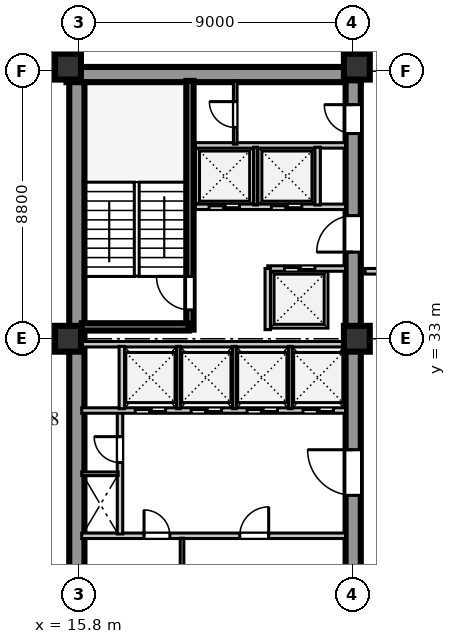
"""IFC4 building model, lengths in metres.
Left out: names, types, materials, properties, quantities, classifications, styles, units other than length and angle.
Written with IfcOpenShell. Run it as: python <this file> out.ifc"""

import sys

from ifc_helpers import new_model, si_unit, direction, frame, frame_2d, origin, origin_2d, place, context, subcontext, project, spatial, rectangle, extrude, element, fill, save


model = new_model("IFC4")
c1 = context("Model", 3, precision=1e-05, world=origin(), true_north=direction((0.0, 1.0)))
c2 = subcontext(c1, "Body", "Model", "MODEL_VIEW")
j1 = project(units=[si_unit("LENGTHUNIT", "METRE"), si_unit("PLANEANGLEUNIT", "RADIAN")], contexts=[c1])
p1 = place(None, origin())
s1 = spatial("IfcSite", under=j1, at=p1, CompositionType="ELEMENT")
p2 = place(p1, origin())
s2 = spatial("IfcBuilding", under=s1, at=p2, CompositionType="ELEMENT")
p3 = place(p2, frame((0.0, 0.0, 157.9)))
s3 = spatial("IfcBuildingStorey", under=s2, at=p3, CompositionType="ELEMENT", Elevation=157.9)
p4 = place(p3, frame((15.4, 41.69, 0.0), z_axis=(0.0, 0.0, 1.0), x_axis=(1.0, 0.0, 0.0)))
e1 = element("IfcWall", 1, at=p4, inside=s3, PredefinedType="SHEAR", context=c2, shape_type="SweptSolid", body=[
    extrude(rectangle(XDim=9.68, YDim=0.5, at=frame_2d((4.84, 0.0))), origin(), (0.0, 0.0, 1.0), 3.6),
])
p5 = place(p3, frame((15.74, 15.81, 0.0), z_axis=(0.0, 0.0, 1.0), x_axis=(0.0, 1.0, 0.0)))
e2 = element("IfcWall", 2, at=p5, inside=s3, PredefinedType="SHEAR", context=c2, shape_type="SweptSolid", body=[
    extrude(rectangle(XDim=25.63, YDim=0.5, at=frame_2d((12.815, 0.0))), origin(), (0.0, 0.0, 1.0), 3.6),
])
p6 = place(p3, frame((24.83, 15.74, 0.0), z_axis=(0.0, 0.0, 1.0), x_axis=(0.0, 1.0, 0.0)))
e3 = element("IfcWall", 3, at=p6, inside=s3, PredefinedType="SHEAR", context=c2, shape_type="SweptSolid", body=[
    extrude(rectangle(XDim=25.76, YDim=0.5, at=frame_2d((12.88, 0.0))), origin(), (0.0, 0.0, 1.0), 3.6),
])
p7 = place(p6, frame((1.61, 0.0, 0.0)))
e4 = element("IfcOpeningElement", 4, at=p7, cuts=e3, PredefinedType="OPENING", context=c2, shape_type="SweptSolid", body=[
    extrude(rectangle(XDim=1.2, YDim=2.1, at=frame_2d((0.6, 1.05))), frame((0.0, 0.26, 0.0), z_axis=(0.0, -1.0, 0.0), x_axis=(1.0, 0.0, 0.0)), (0.0, 0.0, 1.0), 0.52),
])
p8 = place(p6, frame((6.78, 0.0, 0.0)))
e5 = element("IfcOpeningElement", 5, at=p8, cuts=e3, PredefinedType="OPENING", context=c2, shape_type="SweptSolid", body=[
    extrude(rectangle(XDim=0.85, YDim=2.06, at=frame_2d((0.425, 1.03))), frame((0.0, 0.26, 0.0), z_axis=(0.0, -1.0, 0.0), x_axis=(1.0, 0.0, 0.0)), (0.0, 0.0, 1.0), 0.52),
])
p9 = place(p6, frame((12.11, 0.0, 0.0)))
e6 = element("IfcOpeningElement", 6, at=p9, cuts=e3, PredefinedType="OPENING", context=c2, shape_type="SweptSolid", body=[
    extrude(rectangle(XDim=1.5, YDim=2.12, at=frame_2d((0.75, 1.06))), frame((0.0, 0.26, 0.0), z_axis=(0.0, -1.0, 0.0), x_axis=(1.0, 0.0, 0.0)), (0.0, 0.0, 1.0), 0.52),
])
p10 = place(p6, frame((20.11, 0.0, 0.0)))
e7 = element("IfcOpeningElement", 7, at=p10, cuts=e3, PredefinedType="OPENING", context=c2, shape_type="SweptSolid", body=[
    extrude(rectangle(XDim=1.2, YDim=2.12, at=frame_2d((0.6, 1.06))), frame((0.0, 0.26, 0.0), z_axis=(0.0, -1.0, 0.0), x_axis=(1.0, 0.0, 0.0)), (0.0, 0.0, 1.0), 0.52),
])
p11 = place(p6, frame((24.01, 0.0, 0.0)))
e8 = element("IfcOpeningElement", 8, at=p11, cuts=e3, PredefinedType="OPENING", context=c2, shape_type="SweptSolid", body=[
    extrude(rectangle(XDim=0.95, YDim=2.1, at=frame_2d((0.475, 1.05))), frame((0.0, 0.26, 0.0), z_axis=(0.0, -1.0, 0.0), x_axis=(1.0, 0.0, 0.0)), (0.0, 0.0, 1.0), 0.52),
])
for number, where, z_axis, x_axis in (
    (9, (15.45, 33.0, 0.0), (0.0, 0.0, 1.0), (1.0, 0.0, 0.0)),
    (10, (15.45, 41.95, 0.0), (0.0, 0.0, 1.0), (1.0, 0.0, 0.0)),
    (11, (24.95, 33.0, 0.0), (0.0, 0.0, 1.0), (1.0, 0.0, 0.0)),
    (12, (24.95, 41.95, 0.0), (0.0, 0.0, 1.0), (1.0, 0.0, 0.0)),
):
    element("IfcColumn", number, at=place(p3, frame(where, z_axis=z_axis, x_axis=x_axis)), inside=s3, PredefinedType="COLUMN", context=c2, shape_type="SweptSolid", body=[
        extrude(rectangle(XDim=0.85, YDim=0.85, at=origin_2d()), origin(), (0.0, 0.0, 1.0), 3.6),
    ])
p12 = place(p3, frame((15.9, 26.52, 0.0), z_axis=(0.0, 0.0, 1.0), x_axis=(1.0, 0.0, 0.0)))
e13 = element("IfcWall", 13, at=p12, inside=s3, PredefinedType="SOLIDWALL", context=c2, shape_type="SweptSolid", body=[
    extrude(rectangle(XDim=8.68, YDim=0.18, at=frame_2d((4.34, 0.0))), origin(), (0.0, 0.0, 1.0), 3.6),
])
p13 = place(p12, frame((2.05, 0.0, 0.0)))
e14 = element("IfcOpeningElement", 14, at=p13, cuts=e13, PredefinedType="OPENING", context=c2, shape_type="SweptSolid", body=[
    extrude(rectangle(XDim=0.85, YDim=2.06, at=frame_2d((0.425, 1.03))), frame((0.0, 0.1, 0.0), z_axis=(0.0, -1.0, 0.0), x_axis=(1.0, 0.0, 0.0)), (0.0, 0.0, 1.0), 0.2),
])
p14 = place(p12, frame((5.2, 0.0, 0.0)))
e15 = element("IfcOpeningElement", 15, at=p14, cuts=e13, PredefinedType="OPENING", context=c2, shape_type="SweptSolid", body=[
    extrude(rectangle(XDim=0.95, YDim=2.1, at=frame_2d((0.475, 1.05))), frame((0.0, 0.1, 0.0), z_axis=(0.0, -1.0, 0.0), x_axis=(1.0, 0.0, 0.0)), (0.0, 0.0, 1.0), 0.2),
])
p15 = place(p3, frame((19.2, 24.42, 0.0), z_axis=(0.0, 0.0, 1.0), x_axis=(0.0, 1.0, 0.0)))
e16 = element("IfcWall", 16, at=p15, inside=s3, PredefinedType="PARTITIONING", context=c2, shape_type="SweptSolid", body=[
    extrude(rectangle(XDim=2.02, YDim=0.12, at=frame_2d((1.01, 0.0))), origin(), (0.0, 0.0, 1.0), 3.6),
])
p16 = place(p3, frame((17.16, 26.58, 0.0), z_axis=(0.0, 0.0, 1.0), x_axis=(0.0, 1.0, 0.0)))
e17 = element("IfcWall", 17, at=p16, inside=s3, PredefinedType="SOLIDWALL", context=c2, shape_type="SweptSolid", body=[
    extrude(rectangle(XDim=4.02, YDim=0.18, at=frame_2d((2.01, 0.0))), origin(), (0.0, 0.0, 1.0), 3.6),
])
p17 = place(p16, frame((2.35, 0.0, 0.0)))
e18 = element("IfcOpeningElement", 18, at=p17, cuts=e17, PredefinedType="OPENING", context=c2, shape_type="SweptSolid", body=[
    extrude(rectangle(XDim=0.85, YDim=2.06, at=frame_2d((0.425, 1.03))), frame((0.0, 0.1, 0.0), z_axis=(0.0, -1.0, 0.0), x_axis=(1.0, 0.0, 0.0)), (0.0, 0.0, 1.0), 0.2),
])
p18 = place(p3, frame((15.9, 28.56, 0.0), z_axis=(0.0, 0.0, 1.0), x_axis=(1.0, 0.0, 0.0)))
e19 = element("IfcWall", 19, at=p18, inside=s3, PredefinedType="PARTITIONING", context=c2, shape_type="SweptSolid", body=[
    extrude(rectangle(XDim=1.2, YDim=0.12, at=frame_2d((0.6, 0.0))), origin(), (0.0, 0.0, 1.0), 3.6),
])
p19 = place(p3, frame((15.9, 30.64, 0.0), z_axis=(0.0, 0.0, 1.0), x_axis=(1.0, 0.0, 0.0)))
e20 = element("IfcWall", 20, at=p19, inside=s3, PredefinedType="SOLIDWALL", context=c2, shape_type="SweptSolid", body=[
    extrude(rectangle(XDim=8.68, YDim=0.18, at=frame_2d((4.34, 0.0))), origin(), (0.0, 0.0, 1.0), 3.6),
])
p20 = place(p19, frame((1.76, 0.0, 0.0)))
e21 = element("IfcOpeningElement", 21, at=p20, cuts=e20, PredefinedType="OPENING", context=c2, shape_type="SweptSolid", body=[
    extrude(rectangle(XDim=1.0, YDim=2.1, at=frame_2d((0.5, 1.05))), frame((0.0, 0.1, 0.0), z_axis=(0.0, -1.0, 0.0), x_axis=(1.0, 0.0, 0.0)), (0.0, 0.0, 1.0), 0.2),
])
p21 = place(p19, frame((3.6, 0.0, 0.0)))
e22 = element("IfcOpeningElement", 22, at=p21, cuts=e20, PredefinedType="OPENING", context=c2, shape_type="SweptSolid", body=[
    extrude(rectangle(XDim=1.0, YDim=2.1, at=frame_2d((0.5, 1.05))), frame((0.0, 0.1, 0.0), z_axis=(0.0, -1.0, 0.0), x_axis=(1.0, 0.0, 0.0)), (0.0, 0.0, 1.0), 0.2),
])
p22 = place(p19, frame((5.44, 0.0, 0.0)))
e23 = element("IfcOpeningElement", 23, at=p22, cuts=e20, PredefinedType="OPENING", context=c2, shape_type="SweptSolid", body=[
    extrude(rectangle(XDim=1.0, YDim=2.1, at=frame_2d((0.5, 1.05))), frame((0.0, 0.1, 0.0), z_axis=(0.0, -1.0, 0.0), x_axis=(1.0, 0.0, 0.0)), (0.0, 0.0, 1.0), 0.2),
])
p23 = place(p19, frame((7.28, 0.0, 0.0)))
e24 = element("IfcOpeningElement", 24, at=p23, cuts=e20, PredefinedType="OPENING", context=c2, shape_type="SweptSolid", body=[
    extrude(rectangle(XDim=1.0, YDim=2.1, at=frame_2d((0.5, 1.05))), frame((0.0, 0.1, 0.0), z_axis=(0.0, -1.0, 0.0), x_axis=(1.0, 0.0, 0.0)), (0.0, 0.0, 1.0), 0.2),
])
p24 = place(p3, frame((15.9, 32.82, 0.0), z_axis=(0.0, 0.0, 1.0), x_axis=(1.0, 0.0, 0.0)))
e25 = element("IfcWall", 25, at=p24, inside=s3, PredefinedType="SOLIDWALL", context=c2, shape_type="SweptSolid", body=[
    extrude(rectangle(XDim=8.68, YDim=0.18, at=frame_2d((4.34, 0.0))), origin(), (0.0, 0.0, 1.0), 2.95),
])
p25 = place(p3, frame((17.22, 30.7, 0.0), z_axis=(0.0, 0.0, 1.0), x_axis=(0.0, 1.0, 0.0)))
e26 = element("IfcWall", 26, at=p25, inside=s3, PredefinedType="SOLIDWALL", context=c2, shape_type="SweptSolid", body=[
    extrude(rectangle(XDim=2.05, YDim=0.18, at=frame_2d((1.025, 0.0))), origin(), (0.0, 0.0, 1.0), 3.6),
])
for number, where, z_axis, x_axis in (
    (27, (19.08, 30.7, 0.0), (0.0, 0.0, 1.0), (0.0, 1.0, 0.0)),
    (28, (20.92, 30.7, 0.0), (0.0, 0.0, 1.0), (0.0, 1.0, 0.0)),
    (29, (22.76, 30.7, 0.0), (0.0, 0.0, 1.0), (0.0, 1.0, 0.0)),
):
    element("IfcWall", number, at=place(p3, frame(where, z_axis=z_axis, x_axis=x_axis)), inside=s3, PredefinedType="PARTITIONING", context=c2, shape_type="SweptSolid", body=[
        extrude(rectangle(XDim=2.05, YDim=0.12, at=frame_2d((1.025, 0.0))), origin(), (0.0, 0.0, 1.0), 3.6),
    ])
p26 = place(p3, frame((19.46, 33.3, 0.0), z_axis=(0.0, 0.0, 1.0), x_axis=(0.0, 1.0, 0.0)))
e30 = element("IfcWall", 30, at=p26, inside=s3, PredefinedType="SHEAR", context=c2, shape_type="SweptSolid", body=[
    extrude(rectangle(XDim=8.18, YDim=0.24, at=frame_2d((4.09, 0.0))), origin(), (0.0, 0.0, 1.0), 3.85),
])
p27 = place(p26, frame((0.65, 0.0, 0.0)))
e31 = element("IfcOpeningElement", 31, at=p27, cuts=e30, PredefinedType="OPENING", context=c2, shape_type="SweptSolid", body=[
    extrude(rectangle(XDim=1.1, YDim=2.1, at=frame_2d((0.55, 1.05))), frame((0.0, 0.13, 0.0), z_axis=(0.0, -1.0, 0.0), x_axis=(1.0, 0.0, 0.0)), (0.0, 0.0, 1.0), 0.26),
])
p28 = place(p3, frame((15.9, 33.39, 0.0), z_axis=(0.0, 0.0, 1.0), x_axis=(1.0, 0.0, 0.0)))
e32 = element("IfcWall", 32, at=p28, inside=s3, PredefinedType="SHEAR", context=c2, shape_type="SweptSolid", body=[
    extrude(rectangle(XDim=3.52, YDim=0.24, at=frame_2d((1.76, 0.0))), origin(), (0.0, 0.0, 1.0), 3.85),
])
p29 = place(p3, frame((22.02, 35.31, 0.0), z_axis=(0.0, 0.0, 1.0), x_axis=(1.0, 0.0, 0.0)))
e33 = element("IfcWall", 33, at=p29, inside=s3, PredefinedType="SOLIDWALL", context=c2, shape_type="SweptSolid", body=[
    extrude(rectangle(XDim=2.56, YDim=0.18, at=frame_2d((1.28, 0.0))), origin(), (0.0, 0.0, 1.0), 3.6),
])
p30 = place(p29, frame((0.55, 0.0, 0.0)))
e34 = element("IfcOpeningElement", 34, at=p30, cuts=e33, PredefinedType="OPENING", context=c2, shape_type="SweptSolid", body=[
    extrude(rectangle(XDim=1.0, YDim=2.1, at=frame_2d((0.5, 1.05))), frame((0.0, 0.1, 0.0), z_axis=(0.0, -1.0, 0.0), x_axis=(1.0, 0.0, 0.0)), (0.0, 0.0, 1.0), 0.2),
])
p31 = place(p3, frame((22.02, 33.3, 0.0), z_axis=(0.0, 0.0, 1.0), x_axis=(0.0, 1.0, 0.0)))
e35 = element("IfcWall", 35, at=p31, inside=s3, PredefinedType="SOLIDWALL", context=c2, shape_type="SweptSolid", body=[
    extrude(rectangle(XDim=2.01, YDim=0.18, at=frame_2d((1.005, 0.0))), origin(), (0.0, 0.0, 1.0), 3.6),
])
p32 = place(p3, frame((19.64, 37.34, 0.0), z_axis=(0.0, 0.0, 1.0), x_axis=(1.0, 0.0, 0.0)))
e36 = element("IfcWall", 36, at=p32, inside=s3, PredefinedType="SOLIDWALL", context=c2, shape_type="SweptSolid", body=[
    extrude(rectangle(XDim=4.94, YDim=0.18, at=frame_2d((2.47, 0.0))), origin(), (0.0, 0.0, 1.0), 3.6),
])
p33 = place(p32, frame((0.45, 0.0, 0.0)))
e37 = element("IfcOpeningElement", 37, at=p33, cuts=e36, PredefinedType="OPENING", context=c2, shape_type="SweptSolid", body=[
    extrude(rectangle(XDim=1.0, YDim=2.1, at=frame_2d((0.5, 1.05))), frame((0.0, 0.1, 0.0), z_axis=(0.0, -1.0, 0.0), x_axis=(1.0, 0.0, 0.0)), (0.0, 0.0, 1.0), 0.2),
])
p34 = place(p32, frame((2.5, 0.0, 0.0)))
e38 = element("IfcOpeningElement", 38, at=p34, cuts=e36, PredefinedType="OPENING", context=c2, shape_type="SweptSolid", body=[
    extrude(rectangle(XDim=1.0, YDim=2.1, at=frame_2d((0.5, 1.05))), frame((0.0, 0.1, 0.0), z_axis=(0.0, -1.0, 0.0), x_axis=(1.0, 0.0, 0.0)), (0.0, 0.0, 1.0), 0.2),
])
p35 = place(p3, frame((19.64, 39.36, 0.0), z_axis=(0.0, 0.0, 1.0), x_axis=(1.0, 0.0, 0.0)))
e39 = element("IfcWall", 39, at=p35, inside=s3, PredefinedType="SOLIDWALL", context=c2, shape_type="SweptSolid", body=[
    extrude(rectangle(XDim=4.94, YDim=0.18, at=frame_2d((2.47, 0.0))), origin(), (0.0, 0.0, 1.0), 3.6),
])
p36 = place(p3, frame((21.62, 37.4, 0.0), z_axis=(0.0, 0.0, 1.0), x_axis=(0.0, 1.0, 0.0)))
e40 = element("IfcWall", 40, at=p36, inside=s3, PredefinedType="PARTITIONING", context=c2, shape_type="SweptSolid", body=[
    extrude(rectangle(XDim=1.9, YDim=0.12, at=frame_2d((0.95, 0.0))), origin(), (0.0, 0.0, 1.0), 3.6),
])
p37 = place(p3, frame((23.66, 37.4, 0.0), z_axis=(0.0, 0.0, 1.0), x_axis=(0.0, 1.0, 0.0)))
e41 = element("IfcWall", 41, at=p37, inside=s3, PredefinedType="SOLIDWALL", context=c2, shape_type="SweptSolid", body=[
    extrude(rectangle(XDim=1.9, YDim=0.18, at=frame_2d((0.95, 0.0))), origin(), (0.0, 0.0, 1.0), 3.6),
])
p38 = place(p3, frame((20.95, 39.4, 0.0), z_axis=(0.0, 0.0, 1.0), x_axis=(0.0, 1.0, 0.0)))
e42 = element("IfcWall", 42, at=p38, inside=s3, PredefinedType="PARTITIONING", context=c2, shape_type="SweptSolid", body=[
    extrude(rectangle(XDim=2.08, YDim=0.12, at=frame_2d((1.04, 0.0))), origin(), (0.0, 0.0, 1.0), 3.6),
])
p39 = place(p38, frame((0.55, 0.0, 0.0)))
e43 = element("IfcOpeningElement", 43, at=p39, cuts=e42, PredefinedType="OPENING", context=c2, shape_type="SweptSolid", body=[
    extrude(rectangle(XDim=0.85, YDim=2.06, at=frame_2d((0.425, 1.03))), frame((0.0, 0.07, 0.0), z_axis=(0.0, -1.0, 0.0), x_axis=(1.0, 0.0, 0.0)), (0.0, 0.0, 1.0), 0.14),
])
p40 = place(p3, frame((25.22, 35.22, 0.0), z_axis=(0.0, 0.0, 1.0), x_axis=(1.0, 0.0, 0.0)))
e44 = element("IfcWall", 44, at=p40, inside=s3, PredefinedType="SOLIDWALL", context=c2, shape_type="SweptSolid", body=[
    extrude(rectangle(XDim=9.5, YDim=0.185, at=frame_2d((4.75, 0.0))), origin(), (0.0, 0.0, 1.0), 3.6),
])
p41 = place(p40, frame((1.2, 0.0, 0.0)))
e45 = element("IfcOpeningElement", 45, at=p41, cuts=e44, PredefinedType="OPENING", context=c2, shape_type="SweptSolid", body=[
    extrude(rectangle(XDim=0.95, YDim=2.1, at=frame_2d((0.475, 1.05))), frame((0.0, 0.103, 0.0), z_axis=(0.0, -1.0, 0.0), x_axis=(1.0, 0.0, 0.0)), (0.0, 0.0, 1.0), 0.205),
])
p42 = place(p13, origin())
e46 = element("IfcDoor", 46, at=p42, inside=s3, OperationType="SINGLE_SWING_LEFT", PredefinedType="DOOR", context=c2, shape_type="SweptSolid", body=[
    extrude(rectangle(XDim=0.85, YDim=2.06, at=frame_2d((0.425, 1.03))), frame((0.0, 0.025, 0.0), z_axis=(0.0, -1.0, 0.0), x_axis=(1.0, 0.0, 0.0)), (0.0, 0.0, 1.0), 0.05),
])
fill(e14, e46)
p43 = place(p14, origin())
e47 = element("IfcDoor", 47, at=p43, inside=s3, OperationType="SINGLE_SWING_RIGHT", PredefinedType="DOOR", context=c2, shape_type="SweptSolid", body=[
    extrude(rectangle(XDim=0.95, YDim=2.1, at=frame_2d((0.475, 1.05))), frame((0.0, 0.025, 0.0), z_axis=(0.0, -1.0, 0.0), x_axis=(1.0, 0.0, 0.0)), (0.0, 0.0, 1.0), 0.05),
])
fill(e15, e47)
p44 = place(p17, origin())
e48 = element("IfcDoor", 48, at=p44, inside=s3, OperationType="SINGLE_SWING_RIGHT", PredefinedType="DOOR", context=c2, shape_type="SweptSolid", body=[
    extrude(rectangle(XDim=0.85, YDim=2.06, at=frame_2d((0.425, 1.03))), frame((0.0, 0.025, 0.0), z_axis=(0.0, -1.0, 0.0), x_axis=(1.0, 0.0, 0.0)), (0.0, 0.0, 1.0), 0.05),
])
fill(e18, e48)
p45 = place(p9, frame((1.5, 0.0, 0.0), z_axis=(0.0, 0.0, 1.0), x_axis=(-1.0, 0.0, 0.0)))
e49 = element("IfcDoor", 49, at=p45, inside=s3, OperationType="SINGLE_SWING_LEFT", PredefinedType="DOOR", context=c2, shape_type="SweptSolid", body=[
    extrude(rectangle(XDim=1.5, YDim=2.12, at=frame_2d((0.75, 1.06))), frame((0.0, 0.025, 0.0), z_axis=(0.0, -1.0, 0.0), x_axis=(1.0, 0.0, 0.0)), (0.0, 0.0, 1.0), 0.05),
])
fill(e6, e49)
p46 = place(p20, frame((1.0, 0.0, 0.0), z_axis=(0.0, 0.0, 1.0), x_axis=(-1.0, 0.0, 0.0)))
e50 = element("IfcDoor", 50, at=p46, inside=s3, OperationType="DOUBLE_DOOR_SLIDING", PredefinedType="DOOR", context=c2, shape_type="SweptSolid", body=[
    extrude(rectangle(XDim=1.0, YDim=2.1, at=frame_2d((0.5, 1.05))), frame((0.0, 0.025, 0.0), z_axis=(0.0, -1.0, 0.0), x_axis=(1.0, 0.0, 0.0)), (0.0, 0.0, 1.0), 0.05),
])
fill(e21, e50)
p47 = place(p21, frame((1.0, 0.0, 0.0), z_axis=(0.0, 0.0, 1.0), x_axis=(-1.0, 0.0, 0.0)))
e51 = element("IfcDoor", 51, at=p47, inside=s3, OperationType="DOUBLE_DOOR_SLIDING", PredefinedType="DOOR", context=c2, shape_type="SweptSolid", body=[
    extrude(rectangle(XDim=1.0, YDim=2.1, at=frame_2d((0.5, 1.05))), frame((0.0, 0.025, 0.0), z_axis=(0.0, -1.0, 0.0), x_axis=(1.0, 0.0, 0.0)), (0.0, 0.0, 1.0), 0.05),
])
fill(e22, e51)
p48 = place(p22, frame((1.0, 0.0, 0.0), z_axis=(0.0, 0.0, 1.0), x_axis=(-1.0, 0.0, 0.0)))
e52 = element("IfcDoor", 52, at=p48, inside=s3, OperationType="DOUBLE_DOOR_SLIDING", PredefinedType="DOOR", context=c2, shape_type="SweptSolid", body=[
    extrude(rectangle(XDim=1.0, YDim=2.1, at=frame_2d((0.5, 1.05))), frame((0.0, 0.025, 0.0), z_axis=(0.0, -1.0, 0.0), x_axis=(1.0, 0.0, 0.0)), (0.0, 0.0, 1.0), 0.05),
])
fill(e23, e52)
p49 = place(p23, frame((1.0, 0.0, 0.0), z_axis=(0.0, 0.0, 1.0), x_axis=(-1.0, 0.0, 0.0)))
e53 = element("IfcDoor", 53, at=p49, inside=s3, OperationType="DOUBLE_DOOR_SLIDING", PredefinedType="DOOR", context=c2, shape_type="SweptSolid", body=[
    extrude(rectangle(XDim=1.0, YDim=2.1, at=frame_2d((0.5, 1.05))), frame((0.0, 0.025, 0.0), z_axis=(0.0, -1.0, 0.0), x_axis=(1.0, 0.0, 0.0)), (0.0, 0.0, 1.0), 0.05),
])
fill(e24, e53)
p50 = place(p27, origin())
e54 = element("IfcDoor", 54, at=p50, inside=s3, OperationType="SINGLE_SWING_RIGHT", PredefinedType="DOOR", context=c2, shape_type="SweptSolid", body=[
    extrude(rectangle(XDim=1.1, YDim=2.1, at=frame_2d((0.55, 1.05))), frame((0.0, 0.025, 0.0), z_axis=(0.0, -1.0, 0.0), x_axis=(1.0, 0.0, 0.0)), (0.0, 0.0, 1.0), 0.05),
])
fill(e31, e54)
p51 = place(p10, frame((1.2, 0.0, 0.0), z_axis=(0.0, 0.0, 1.0), x_axis=(-1.0, 0.0, 0.0)))
e55 = element("IfcDoor", 55, at=p51, inside=s3, OperationType="SINGLE_SWING_RIGHT", PredefinedType="DOOR", context=c2, shape_type="SweptSolid", body=[
    extrude(rectangle(XDim=1.2, YDim=2.12, at=frame_2d((0.6, 1.06))), frame((0.0, 0.025, 0.0), z_axis=(0.0, -1.0, 0.0), x_axis=(1.0, 0.0, 0.0)), (0.0, 0.0, 1.0), 0.05),
])
fill(e7, e55)
p52 = place(p33, frame((1.0, 0.0, 0.0), z_axis=(0.0, 0.0, 1.0), x_axis=(-1.0, 0.0, 0.0)))
e56 = element("IfcDoor", 56, at=p52, inside=s3, OperationType="DOUBLE_DOOR_SLIDING", PredefinedType="DOOR", context=c2, shape_type="SweptSolid", body=[
    extrude(rectangle(XDim=1.0, YDim=2.1, at=frame_2d((0.5, 1.05))), frame((0.0, 0.025, 0.0), z_axis=(0.0, -1.0, 0.0), x_axis=(1.0, 0.0, 0.0)), (0.0, 0.0, 1.0), 0.05),
])
fill(e37, e56)
p53 = place(p34, frame((1.0, 0.0, 0.0), z_axis=(0.0, 0.0, 1.0), x_axis=(-1.0, 0.0, 0.0)))
e57 = element("IfcDoor", 57, at=p53, inside=s3, OperationType="DOUBLE_DOOR_SLIDING", PredefinedType="DOOR", context=c2, shape_type="SweptSolid", body=[
    extrude(rectangle(XDim=1.0, YDim=2.1, at=frame_2d((0.5, 1.05))), frame((0.0, 0.025, 0.0), z_axis=(0.0, -1.0, 0.0), x_axis=(1.0, 0.0, 0.0)), (0.0, 0.0, 1.0), 0.05),
])
fill(e38, e57)
p54 = place(p30, origin())
e58 = element("IfcDoor", 58, at=p54, inside=s3, OperationType="DOUBLE_DOOR_SLIDING", PredefinedType="DOOR", context=c2, shape_type="SweptSolid", body=[
    extrude(rectangle(XDim=1.0, YDim=2.1, at=frame_2d((0.5, 1.05))), frame((0.0, 0.025, 0.0), z_axis=(0.0, -1.0, 0.0), x_axis=(1.0, 0.0, 0.0)), (0.0, 0.0, 1.0), 0.05),
])
fill(e34, e58)
p55 = place(p39, origin())
e59 = element("IfcDoor", 59, at=p55, inside=s3, OperationType="SINGLE_SWING_RIGHT", PredefinedType="DOOR", context=c2, shape_type="SweptSolid", body=[
    extrude(rectangle(XDim=0.85, YDim=2.06, at=frame_2d((0.425, 1.03))), frame((0.0, 0.025, 0.0), z_axis=(0.0, -1.0, 0.0), x_axis=(1.0, 0.0, 0.0)), (0.0, 0.0, 1.0), 0.05),
])
fill(e43, e59)
p56 = place(p11, frame((0.95, 0.0, 0.0), z_axis=(0.0, 0.0, 1.0), x_axis=(-1.0, 0.0, 0.0)))
e60 = element("IfcDoor", 60, at=p56, inside=s3, OperationType="SINGLE_SWING_LEFT", PredefinedType="DOOR", context=c2, shape_type="SweptSolid", body=[
    extrude(rectangle(XDim=0.95, YDim=2.1, at=frame_2d((0.475, 1.05))), frame((0.0, 0.025, 0.0), z_axis=(0.0, -1.0, 0.0), x_axis=(1.0, 0.0, 0.0)), (0.0, 0.0, 1.0), 0.05),
])
fill(e8, e60)
save(model, sys.argv[1])
